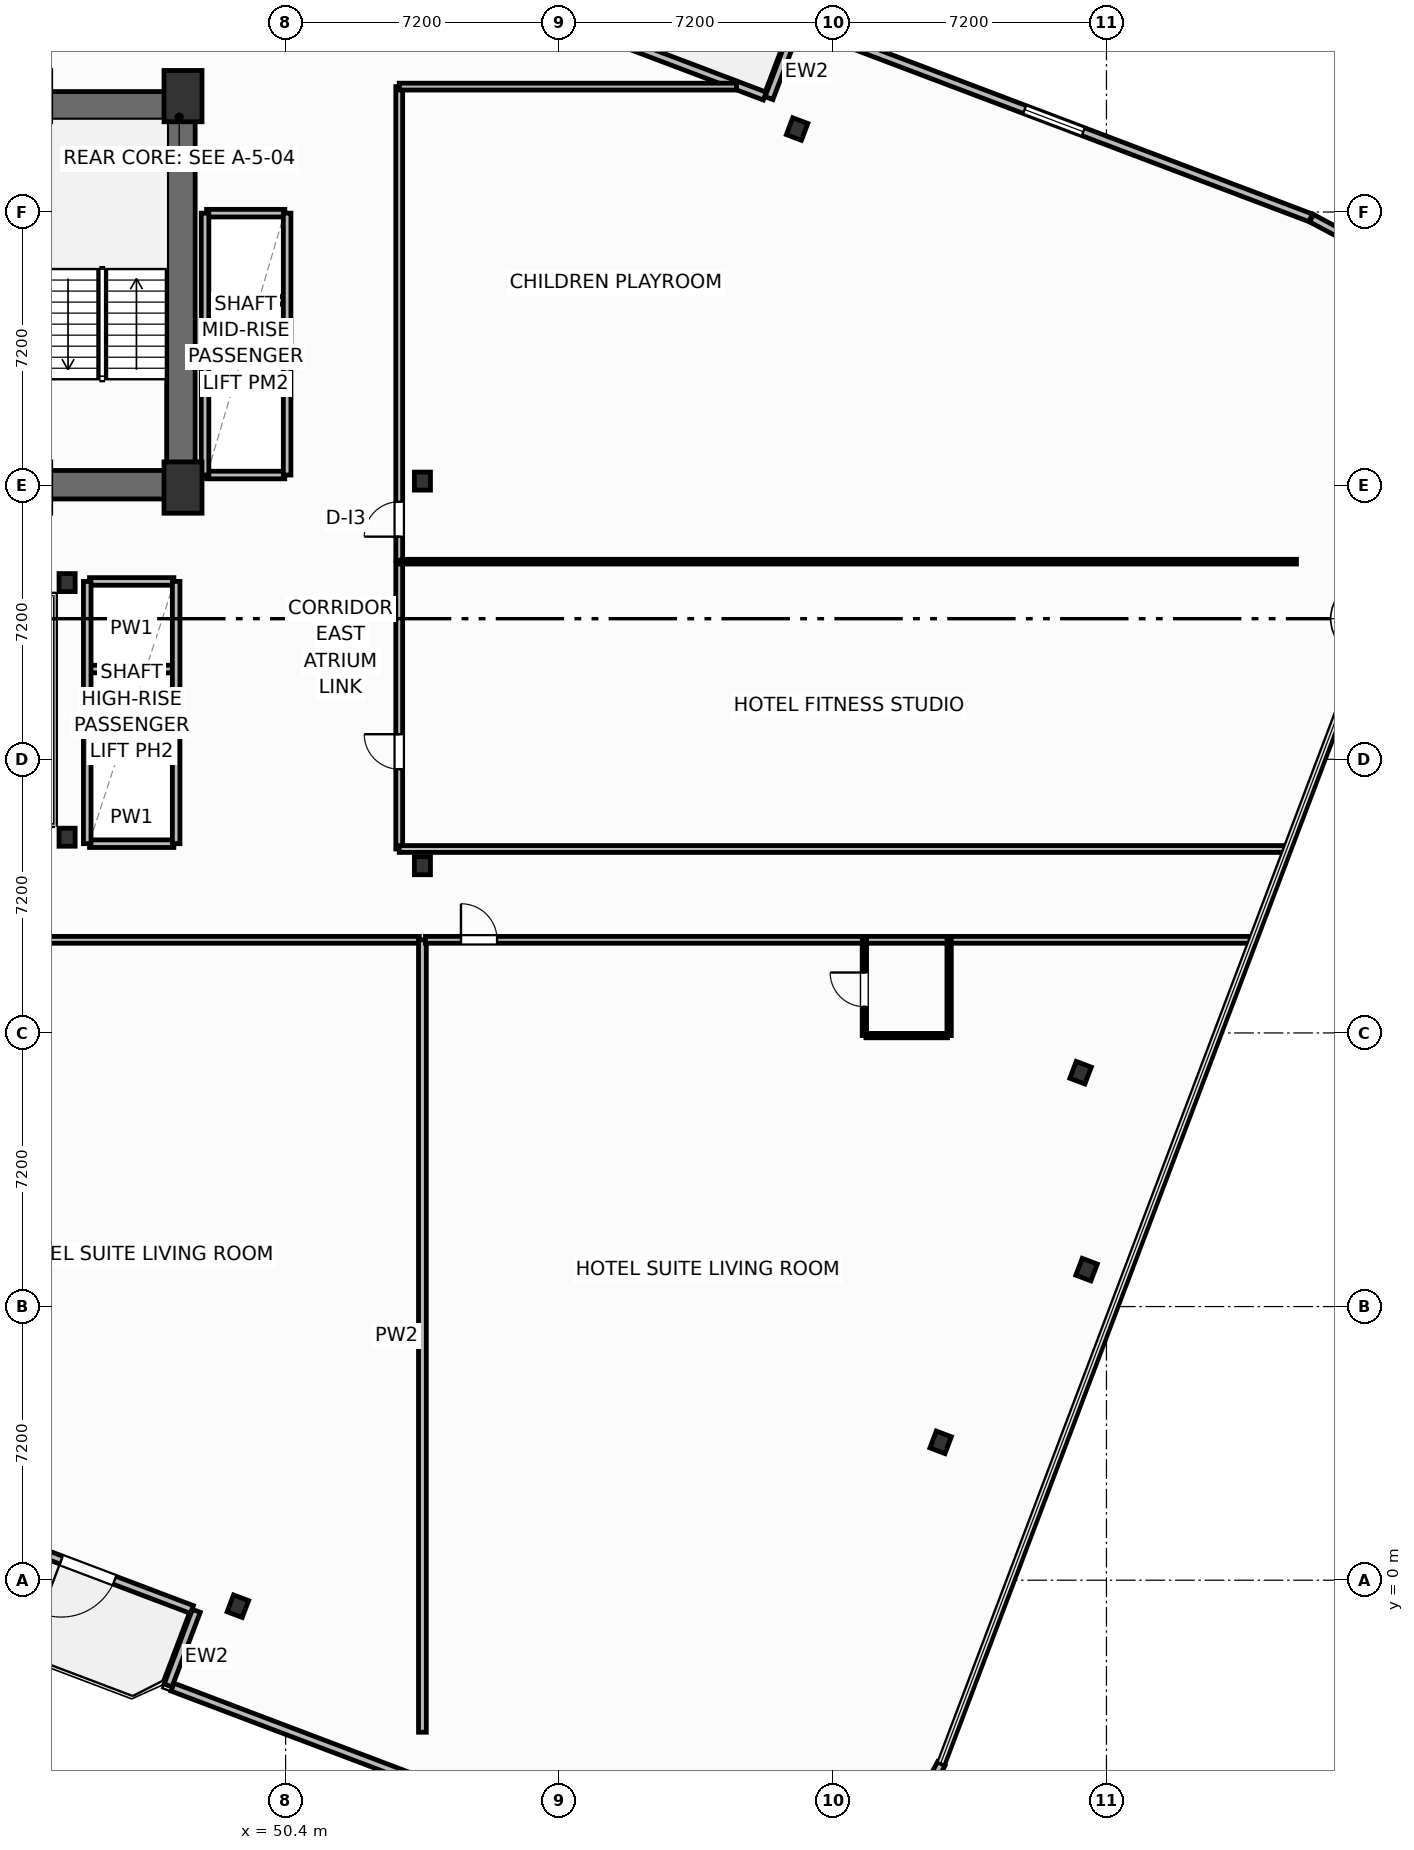
"""IFC4 building model, lengths in metres.
Left out: names, types, materials, properties, quantities, classifications, styles, units other than length and angle.
Written with IfcOpenShell. Run it as: python <this file> out.ifc"""

import sys

from ifc_helpers import new_model, si_unit, direction, frame, frame_2d, origin, origin_2d, place, context, subcontext, project, spatial, rectangle, i_section, extrude, element, fill, save


model = new_model("IFC4")
c1 = context("Model", 3, precision=1e-05, world=origin(), true_north=direction((0.0, 1.0)))
c2 = subcontext(c1, "Body", "Model", "MODEL_VIEW")
j1 = project(units=[si_unit("LENGTHUNIT", "METRE"), si_unit("PLANEANGLEUNIT", "RADIAN")], contexts=[c1])
p1 = place(None, origin())
s1 = spatial("IfcSite", under=j1, at=p1, CompositionType="ELEMENT")
p2 = place(p1, origin())
s2 = spatial("IfcBuilding", under=s1, at=p2, CompositionType="ELEMENT")
p3 = place(p2, frame((0.0, 0.0, 98.4)))
s3 = spatial("IfcBuildingStorey", under=s2, at=p3, CompositionType="ELEMENT", Elevation=98.4)
for number, where, z_axis, x_axis in (
    (1, (47.7, 28.75, 0.0), (0.0, 0.0, 1.0), (1.0, 0.0, 0.0)),
    (2, (47.7, 39.05, 0.0), (0.0, 0.0, 1.0), (1.0, 0.0, 0.0)),
):
    element("IfcColumn", number, at=place(p3, frame(where, z_axis=z_axis, x_axis=x_axis)), inside=s3, PredefinedType="COLUMN", context=c2, shape_type="SweptSolid", body=[
        extrude(rectangle(XDim=1.0, YDim=1.35, at=origin_2d()), origin(), (0.0, 0.0, 1.0), 3.7),
    ])
for number, where, z_axis, x_axis in (
    (3, (44.65, 19.55, 0.0), (0.0, 0.0, 1.0), (1.0, 0.0, 0.0)),
    (4, (44.65, 26.25, 0.0), (0.0, 0.0, 1.0), (1.0, 0.0, 0.0)),
    (5, (54.0, 18.8, 0.0), (0.0, 0.0, 1.0), (1.0, 0.0, 0.0)),
    (6, (54.0, 28.92, 0.0), (0.0, 0.0, 1.0), (1.0, 0.0, 0.0)),
):
    element("IfcColumn", number, at=place(p3, frame(where, z_axis=z_axis, x_axis=x_axis)), inside=s3, PredefinedType="COLUMN", context=c2, shape_type="SweptSolid", body=[
        extrude(i_section(OverallWidth=0.424, OverallDepth=0.474, WebThickness=0.048, FlangeThickness=0.077, FilletRadius=0.025, at=origin_2d()), origin(), (0.0, 0.0, 1.0), 3.7),
    ])
p4 = place(p3, frame((30.38, 38.795, 0.0), z_axis=(0.0, 0.0, 1.0), x_axis=(1.0, 0.0, 0.0)))
e7 = element("IfcWall", 7, at=p4, inside=s3, PredefinedType="SHEAR", context=c2, shape_type="SweptSolid", body=[
    extrude(rectangle(XDim=17.64, YDim=0.75, at=frame_2d((8.82, 0.0))), origin(), (0.0, 0.0, 1.0), 3.45),
])
p5 = place(p3, frame((47.645, 29.2, 0.0), z_axis=(0.0, 0.0, 1.0), x_axis=(0.0, 1.0, 0.0)))
e8 = element("IfcWall", 8, at=p5, inside=s3, PredefinedType="SHEAR", context=c2, shape_type="SweptSolid", body=[
    extrude(rectangle(XDim=9.22, YDim=0.75, at=frame_2d((4.61, 0.0))), origin(), (0.0, 0.0, 1.0), 3.45),
])
p6 = place(p3, frame((43.6, 28.825, 0.0), z_axis=(0.0, 0.0, 1.0), x_axis=(1.0, 0.0, 0.0)))
e9 = element("IfcWall", 9, at=p6, inside=s3, PredefinedType="SHEAR", context=c2, shape_type="SweptSolid", body=[
    extrude(rectangle(XDim=4.42, YDim=0.75, at=frame_2d((2.21, 0.0))), origin(), (0.0, 0.0, 1.0), 3.45),
])
for number, where, z_axis, x_axis in (
    (10, (49.144, -0.684, 0.0), (0.0, 0.0, 1.0), (0.935, -0.354, 0.0)),
    (11, (67.637, 3.628, 0.0), (0.0, 0.0, 1.0), (0.935, -0.354, 0.0)),
    (12, (71.477, 8.173, 0.0), (0.0, 0.0, 1.0), (0.935, -0.354, 0.0)),
    (13, (71.319, 13.354, 0.0), (0.0, 0.0, 1.0), (0.935, -0.354, 0.0)),
    (14, (63.859, 38.184, 0.0), (0.0, 0.0, 1.0), (0.935, -0.354, 0.0)),
):
    element("IfcColumn", number, at=place(p3, frame(where, z_axis=z_axis, x_axis=x_axis)), inside=s3, PredefinedType="COLUMN", context=c2, shape_type="SweptSolid", body=[
        extrude(i_section(OverallWidth=0.424, OverallDepth=0.474, WebThickness=0.048, FlangeThickness=0.077, FilletRadius=0.025, at=origin_2d()), origin(), (0.0, 0.0, 1.0), 3.7),
    ])
p7 = place(p3, frame((47.935, -0.771, 0.0), z_axis=(0.0, 0.0, 1.0), x_axis=(-0.935227640088, 0.354046976001, 0.0)))
e15 = element("IfcWall", 15, at=p7, inside=s3, PredefinedType="SOLIDWALL", context=c2, shape_type="SweptSolid", body=[
    extrude(rectangle(XDim=6.0, YDim=0.22, at=frame_2d((3.0, 0.0))), origin(), (0.0, 0.0, 1.0), 2.73),
])
p8 = place(p7, frame((2.176, 0.0, 0.0)))
e16 = element("IfcOpeningElement", 16, at=p8, cuts=e15, PredefinedType="OPENING", context=c2, shape_type="SweptSolid", body=[
    extrude(rectangle(XDim=1.5, YDim=2.25, at=frame_2d((0.75, 1.125))), frame((0.0, 0.12, 0.0), z_axis=(0.0, -1.0, 0.0), x_axis=(1.0, 0.0, 0.0)), (0.0, 0.0, 1.0), 0.24),
])
p9 = place(p3, frame((57.399, 41.175, 0.0), z_axis=(0.0, 0.0, 1.0), x_axis=(0.935227640088, -0.354046976001, 0.0)))
e17 = element("IfcWall", 17, at=p9, inside=s3, PredefinedType="SOLIDWALL", context=c2, shape_type="SweptSolid", body=[
    extrude(rectangle(XDim=6.0, YDim=0.22, at=frame_2d((3.0, 0.0))), origin(), (0.0, 0.0, 1.0), 2.73),
])
p10 = place(p9, frame((0.4, 0.0, 0.0)))
e18 = element("IfcOpeningElement", 18, at=p10, cuts=e17, PredefinedType="OPENING", context=c2, shape_type="SweptSolid", body=[
    extrude(rectangle(XDim=1.5, YDim=2.25, at=frame_2d((0.75, 1.125))), frame((0.0, 0.12, 0.0), z_axis=(0.0, -1.0, 0.0), x_axis=(1.0, 0.0, 0.0)), (0.0, 0.0, 1.0), 0.24),
])
p11 = place(p3, frame((48.051, -0.805, 0.0), z_axis=(0.0, 0.0, 1.0), x_axis=(-0.353988291547, -0.935249854022, 0.0)))
e19 = element("IfcWall", 19, at=p11, inside=s3, PredefinedType="SOLIDWALL", context=c2, shape_type="SweptSolid", body=[
    extrude(rectangle(XDim=2.1, YDim=0.22, at=frame_2d((1.05, 0.0))), origin(), (0.0, 0.0, 1.0), 2.73),
])
p12 = place(p3, frame((47.424, -2.813, 0.0), z_axis=(0.0, 0.0, 1.0), x_axis=(0.935225962032, -0.354051408614, 0.0)))
e20 = element("IfcWall", 20, at=p12, inside=s3, PredefinedType="SOLIDWALL", context=c2, shape_type="SweptSolid", body=[
    extrude(rectangle(XDim=14.347, YDim=0.22, at=frame_2d((7.173, 0.0))), origin(), (0.0, 0.0, 1.0), 2.73),
])
p13 = place(p12, frame((6.348, 0.0, 0.8)))
e21 = element("IfcOpeningElement", 21, at=p13, cuts=e20, PredefinedType="OPENING", context=c2, shape_type="SweptSolid", body=[
    extrude(rectangle(XDim=1.65, YDim=1.65, at=frame_2d((0.825, 0.825))), frame((0.0, 0.12, 0.0), z_axis=(0.0, -1.0, 0.0), x_axis=(1.0, 0.0, 0.0)), (0.0, 0.0, 1.0), 0.24),
])
p14 = place(p3, frame((67.015, -6.019, 0.0), z_axis=(0.0, 0.0, 1.0), x_axis=(0.473077364598, 0.881020889142, 0.0)))
e22 = element("IfcWall", 22, at=p14, inside=s3, PredefinedType="SOLIDWALL", context=c2, shape_type="SweptSolid", body=[
    extrude(rectangle(XDim=1.353, YDim=0.22, at=frame_2d((0.677, 0.0))), origin(), (0.0, 0.0, 1.0), 2.73),
])
p15 = place(p3, frame((78.597, 35.194, 0.0), z_axis=(0.0, 0.0, 1.0), x_axis=(-0.880948732004, 0.473211719614, 0.0)))
e23 = element("IfcWall", 23, at=p15, inside=s3, PredefinedType="SOLIDWALL", context=c2, shape_type="SweptSolid", body=[
    extrude(rectangle(XDim=1.361, YDim=0.22, at=frame_2d((0.681, 0.0))), origin(), (0.0, 0.0, 1.0), 2.73),
])
p16 = place(p3, frame((77.375, 35.847, 0.0), z_axis=(0.0, 0.0, 1.0), x_axis=(-0.935222448475, 0.354060689526, 0.0)))
e24 = element("IfcWall", 24, at=p16, inside=s3, PredefinedType="SOLIDWALL", context=c2, shape_type="SweptSolid", body=[
    extrude(rectangle(XDim=14.447, YDim=0.22, at=frame_2d((7.224, 0.0))), origin(), (0.0, 0.0, 1.0), 2.73),
])
p17 = place(p16, frame((6.399, 0.0, 0.8)))
e25 = element("IfcOpeningElement", 25, at=p17, cuts=e24, PredefinedType="OPENING", context=c2, shape_type="SweptSolid", body=[
    extrude(rectangle(XDim=1.65, YDim=1.65, at=frame_2d((0.825, 0.825))), frame((0.0, 0.12, 0.0), z_axis=(0.0, -1.0, 0.0), x_axis=(1.0, 0.0, 0.0)), (0.0, 0.0, 1.0), 0.24),
])
p18 = place(p3, frame((63.819, 40.845, 0.0), z_axis=(0.0, 0.0, 1.0), x_axis=(-0.354128791944, -0.935196663123, 0.0)))
e26 = element("IfcWall", 26, at=p18, inside=s3, PredefinedType="SOLIDWALL", context=c2, shape_type="SweptSolid", body=[
    extrude(rectangle(XDim=1.975, YDim=0.22, at=frame_2d((0.988, 0.0))), origin(), (0.0, 0.0, 1.0), 2.73),
])
p19 = place(p3, frame((39.28, 16.85, 0.0), z_axis=(0.0, 0.0, 1.0), x_axis=(1.0, 0.0, 0.0)))
e27 = element("IfcWall", 27, at=p19, inside=s3, PredefinedType="PARTITIONING", context=c2, shape_type="SweptSolid", body=[
    extrude(rectangle(XDim=14.64, YDim=0.18, at=frame_2d((7.32, 0.0))), origin(), (0.0, 0.0, 1.0), 3.45),
])
p20 = place(p19, frame((3.322, 0.0, 0.0)))
e28 = element("IfcOpeningElement", 28, at=p20, cuts=e27, PredefinedType="OPENING", context=c2, shape_type="SweptSolid", body=[
    extrude(rectangle(XDim=0.95, YDim=2.15, at=frame_2d((0.475, 1.075))), frame((0.0, 0.1, 0.0), z_axis=(0.0, -1.0, 0.0), x_axis=(1.0, 0.0, 0.0)), (0.0, 0.0, 1.0), 0.2),
])
p21 = place(p3, frame((54.0, -4.0, 0.0), z_axis=(0.0, 0.0, 1.0), x_axis=(0.0, 1.0, 0.0)))
e29 = element("IfcWall", 29, at=p21, inside=s3, PredefinedType="PARTITIONING", context=c2, shape_type="SweptSolid", body=[
    extrude(rectangle(XDim=20.85, YDim=0.205, at=frame_2d((10.425, 0.0))), origin(), (0.0, 0.0, 1.0), 3.45),
])
p22 = place(p3, frame((54.08, 16.85, 0.0), z_axis=(0.0, 0.0, 1.0), x_axis=(1.0, 0.0, 0.0)))
e30 = element("IfcWall", 30, at=p22, inside=s3, PredefinedType="PARTITIONING", context=c2, shape_type="SweptSolid", body=[
    extrude(rectangle(XDim=21.722, YDim=0.18, at=frame_2d((10.861, 0.0))), origin(), (0.0, 0.0, 1.0), 2.58),
])
p23 = place(p22, frame((0.934, 0.0, 0.0)))
e31 = element("IfcOpeningElement", 31, at=p23, cuts=e30, PredefinedType="OPENING", context=c2, shape_type="SweptSolid", body=[
    extrude(rectangle(XDim=0.95, YDim=2.15, at=frame_2d((0.475, 1.075))), frame((0.0, 0.1, 0.0), z_axis=(0.0, -1.0, 0.0), x_axis=(1.0, 0.0, 0.0)), (0.0, 0.0, 1.0), 0.2),
])
p24 = place(p3, frame((65.67, 14.33, 0.0), z_axis=(0.0, 0.0, 1.0), x_axis=(1.0, 0.0, 0.0)))
e32 = element("IfcWall", 32, at=p24, inside=s3, PredefinedType="PARTITIONING", context=c2, shape_type="SweptSolid", body=[
    extrude(rectangle(XDim=2.15, YDim=0.115, at=frame_2d((1.075, 0.0))), origin(), (0.0, 0.0, 1.0), 2.58),
])
p25 = place(p3, frame((65.63, 14.33, 0.0), z_axis=(0.0, 0.0, 1.0), x_axis=(0.0, 1.0, 0.0)))
e33 = element("IfcWall", 33, at=p25, inside=s3, PredefinedType="PARTITIONING", context=c2, shape_type="SweptSolid", body=[
    extrude(rectangle(XDim=2.52, YDim=0.115, at=frame_2d((1.26, 0.0))), origin(), (0.0, 0.0, 1.0), 3.45),
])
p26 = place(p25, frame((0.76, 0.0, 0.0)))
e34 = element("IfcOpeningElement", 34, at=p26, cuts=e33, PredefinedType="OPENING", context=c2, shape_type="SweptSolid", body=[
    extrude(rectangle(XDim=0.9, YDim=2.05, at=frame_2d((0.45, 1.025))), frame((0.0, 0.067, 0.0), z_axis=(0.0, -1.0, 0.0), x_axis=(1.0, 0.0, 0.0)), (0.0, 0.0, 1.0), 0.135),
])
p27 = place(p3, frame((67.86, 14.33, 0.0), z_axis=(0.0, 0.0, 1.0), x_axis=(0.0, 1.0, 0.0)))
e35 = element("IfcWall", 35, at=p27, inside=s3, PredefinedType="PARTITIONING", context=c2, shape_type="SweptSolid", body=[
    extrude(rectangle(XDim=2.52, YDim=0.115, at=frame_2d((1.26, 0.0))), origin(), (0.0, 0.0, 1.0), 3.45),
])
p28 = place(p3, frame((53.39, 19.24, 0.0), z_axis=(0.0, 0.0, 1.0), x_axis=(0.0, 1.0, 0.0)))
e36 = element("IfcWall", 36, at=p28, inside=s3, PredefinedType="PARTITIONING", context=c2, shape_type="SweptSolid", body=[
    extrude(rectangle(XDim=7.52, YDim=0.18, at=frame_2d((3.76, 0.0))), origin(), (0.0, 0.0, 1.0), 3.45),
])
p29 = place(p28, frame((2.1, 0.0, 0.0)))
e37 = element("IfcOpeningElement", 37, at=p29, cuts=e36, PredefinedType="OPENING", context=c2, shape_type="SweptSolid", body=[
    extrude(rectangle(XDim=0.92, YDim=2.05, at=frame_2d((0.46, 1.025))), frame((0.0, 0.1, 0.0), z_axis=(0.0, -1.0, 0.0), x_axis=(1.0, 0.0, 0.0)), (0.0, 0.0, 1.0), 0.2),
])
p30 = place(p3, frame((53.39, 26.8, 0.0), z_axis=(0.0, 0.0, 1.0), x_axis=(1.0, 0.0, 0.0)))
e38 = element("IfcWall", 38, at=p30, inside=s3, PredefinedType="PARTITIONING", context=c2, shape_type="SweptSolid", body=[
    extrude(rectangle(XDim=23.61, YDim=0.125, at=frame_2d((11.805, 0.0))), origin(), (0.0, 0.0, 1.0), 3.45),
])
p31 = place(p3, frame((53.39, 19.24, 0.0), z_axis=(0.0, 0.0, 1.0), x_axis=(1.0, 0.0, 0.0)))
e39 = element("IfcWall", 39, at=p31, inside=s3, PredefinedType="PARTITIONING", context=c2, shape_type="SweptSolid", body=[
    extrude(rectangle(XDim=23.317, YDim=0.18, at=frame_2d((11.658, 0.0))), origin(), (0.0, 0.0, 1.0), 3.45),
])
p32 = place(p3, frame((53.39, 26.84, 0.0), z_axis=(0.0, 0.0, 1.0), x_axis=(0.0, 1.0, 0.0)))
e40 = element("IfcWall", 40, at=p32, inside=s3, PredefinedType="PARTITIONING", context=c2, shape_type="SweptSolid", body=[
    extrude(rectangle(XDim=12.46, YDim=0.18, at=frame_2d((6.23, 0.0))), origin(), (0.0, 0.0, 1.0), 3.45),
])
p33 = place(p32, frame((0.618, 0.0, 0.0)))
e41 = element("IfcOpeningElement", 41, at=p33, cuts=e40, PredefinedType="OPENING", context=c2, shape_type="SweptSolid", body=[
    extrude(rectangle(XDim=0.92, YDim=2.05, at=frame_2d((0.46, 1.025))), frame((0.0, 0.1, 0.0), z_axis=(0.0, -1.0, 0.0), x_axis=(1.0, 0.0, 0.0)), (0.0, 0.0, 1.0), 0.2),
])
p34 = place(p3, frame((53.39, 39.3, 0.0), z_axis=(0.0, 0.0, 1.0), x_axis=(1.0, 0.0, 0.0)))
e42 = element("IfcWall", 42, at=p34, inside=s3, PredefinedType="PARTITIONING", context=c2, shape_type="SweptSolid", body=[
    extrude(rectangle(XDim=8.876, YDim=0.18, at=frame_2d((4.438, 0.0))), origin(), (0.0, 0.0, 1.0), 3.45),
])
for number, where, z_axis, x_axis in (
    (43, (48.32, 31.375, 0.0), (0.0, 0.0, 1.0), (1.0, 0.0, 0.0)),
    (44, (48.32, 33.675, 0.0), (0.0, 0.0, 1.0), (1.0, 0.0, 0.0)),
):
    element("IfcWall", number, at=place(p3, frame(where, z_axis=z_axis, x_axis=x_axis)), inside=s3, PredefinedType="PARTITIONING", context=c2, shape_type="SweptSolid", body=[
        extrude(rectangle(XDim=2.06, YDim=0.2, at=frame_2d((1.03, 0.0))), origin(), (0.0, 0.0, 1.0), 3.45),
    ])
p35 = place(p3, frame((48.32, 29.08, 0.0), z_axis=(0.0, 0.0, 1.0), x_axis=(1.0, 0.0, 0.0)))
e45 = element("IfcWall", 45, at=p35, inside=s3, PredefinedType="PARTITIONING", context=c2, shape_type="SweptSolid", body=[
    extrude(rectangle(XDim=2.06, YDim=0.2, at=frame_2d((1.03, 0.0))), origin(), (0.0, 0.0, 1.0), 2.662),
])
p36 = place(p3, frame((48.32, 35.97, 0.0), z_axis=(0.0, 0.0, 1.0), x_axis=(1.0, 0.0, 0.0)))
e46 = element("IfcWall", 46, at=p36, inside=s3, PredefinedType="PARTITIONING", context=c2, shape_type="SweptSolid", body=[
    extrude(rectangle(XDim=2.06, YDim=0.2, at=frame_2d((1.03, 0.0))), origin(), (0.0, 0.0, 1.0), 3.45),
])
for number, where, z_axis, x_axis in (
    (47, (48.28, 29.08, 0.0), (0.0, 0.0, 1.0), (0.0, 1.0, 0.0)),
    (48, (50.44, 29.08, 0.0), (0.0, 0.0, 1.0), (0.0, 1.0, 0.0)),
):
    element("IfcWall", number, at=place(p3, frame(where, z_axis=z_axis, x_axis=x_axis)), inside=s3, PredefinedType="PARTITIONING", context=c2, shape_type="SweptSolid", body=[
        extrude(rectangle(XDim=6.89, YDim=0.2, at=frame_2d((3.445, 0.0))), origin(), (0.0, 0.0, 1.0), 3.45),
    ])
for number, where, z_axis, x_axis in (
    (49, (45.24, 21.675, 0.0), (0.0, 0.0, 1.0), (1.0, 0.0, 0.0)),
    (50, (45.24, 23.975, 0.0), (0.0, 0.0, 1.0), (1.0, 0.0, 0.0)),
):
    element("IfcWall", number, at=place(p3, frame(where, z_axis=z_axis, x_axis=x_axis)), inside=s3, PredefinedType="PARTITIONING", context=c2, shape_type="SweptSolid", body=[
        extrude(rectangle(XDim=2.22, YDim=0.2, at=frame_2d((1.11, 0.0))), origin(), (0.0, 0.0, 1.0), 3.45),
    ])
p37 = place(p3, frame((45.24, 19.38, 0.0), z_axis=(0.0, 0.0, 1.0), x_axis=(1.0, 0.0, 0.0)))
e51 = element("IfcWall", 51, at=p37, inside=s3, PredefinedType="PARTITIONING", context=c2, shape_type="SweptSolid", body=[
    extrude(rectangle(XDim=2.22, YDim=0.2, at=frame_2d((1.11, 0.0))), origin(), (0.0, 0.0, 1.0), 2.662),
])
p38 = place(p3, frame((45.24, 26.28, 0.0), z_axis=(0.0, 0.0, 1.0), x_axis=(1.0, 0.0, 0.0)))
e52 = element("IfcWall", 52, at=p38, inside=s3, PredefinedType="PARTITIONING", context=c2, shape_type="SweptSolid", body=[
    extrude(rectangle(XDim=2.22, YDim=0.2, at=frame_2d((1.11, 0.0))), origin(), (0.0, 0.0, 1.0), 3.45),
])
for number, where, z_axis, x_axis in (
    (53, (45.18, 19.38, 0.0), (0.0, 0.0, 1.0), (0.0, 1.0, 0.0)),
    (54, (47.52, 19.38, 0.0), (0.0, 0.0, 1.0), (0.0, 1.0, 0.0)),
):
    element("IfcWall", number, at=place(p3, frame(where, z_axis=z_axis, x_axis=x_axis)), inside=s3, PredefinedType="PARTITIONING", context=c2, shape_type="SweptSolid", body=[
        extrude(rectangle(XDim=6.9, YDim=0.2, at=frame_2d((3.45, 0.0))), origin(), (0.0, 0.0, 1.0), 3.45),
    ])
p39 = place(p8, origin())
e55 = element("IfcDoor", 55, at=p39, inside=s3, OperationType="SINGLE_SWING_RIGHT", PredefinedType="DOOR", context=c2, shape_type="SweptSolid", body=[
    extrude(rectangle(XDim=1.5, YDim=2.25, at=frame_2d((0.75, 1.125))), frame((0.0, 0.025, 0.0), z_axis=(0.0, -1.0, 0.0), x_axis=(1.0, 0.0, 0.0)), (0.0, 0.0, 1.0), 0.05),
])
fill(e16, e55)
p40 = place(p17, origin())
e56 = element("IfcWindow", 56, at=p40, inside=s3, PartitioningType="SINGLE_PANEL", PredefinedType="WINDOW", context=c2, shape_type="SweptSolid", body=[
    extrude(rectangle(XDim=1.65, YDim=1.65, at=frame_2d((0.825, 0.825))), frame((0.0, 0.03, 0.0), z_axis=(0.0, -1.0, 0.0), x_axis=(1.0, 0.0, 0.0)), (0.0, 0.0, 1.0), 0.06),
])
fill(e25, e56)
p41 = place(p23, origin())
e57 = element("IfcDoor", 57, at=p41, inside=s3, OperationType="SINGLE_SWING_LEFT", PredefinedType="DOOR", context=c2, shape_type="SweptSolid", body=[
    extrude(rectangle(XDim=0.95, YDim=2.15, at=frame_2d((0.475, 1.075))), frame((0.0, 0.025, 0.0), z_axis=(0.0, -1.0, 0.0), x_axis=(1.0, 0.0, 0.0)), (0.0, 0.0, 1.0), 0.05),
])
fill(e31, e57)
p42 = place(p26, origin())
e58 = element("IfcDoor", 58, at=p42, inside=s3, OperationType="SINGLE_SWING_RIGHT", PredefinedType="DOOR", context=c2, shape_type="SweptSolid", body=[
    extrude(rectangle(XDim=0.9, YDim=2.05, at=frame_2d((0.45, 1.025))), frame((0.0, 0.025, 0.0), z_axis=(0.0, -1.0, 0.0), x_axis=(1.0, 0.0, 0.0)), (0.0, 0.0, 1.0), 0.05),
])
fill(e34, e58)
p43 = place(p29, origin())
e59 = element("IfcDoor", 59, at=p43, inside=s3, OperationType="SINGLE_SWING_RIGHT", PredefinedType="DOOR", context=c2, shape_type="SweptSolid", body=[
    extrude(rectangle(XDim=0.92, YDim=2.05, at=frame_2d((0.46, 1.025))), frame((0.0, 0.025, 0.0), z_axis=(0.0, -1.0, 0.0), x_axis=(1.0, 0.0, 0.0)), (0.0, 0.0, 1.0), 0.05),
])
fill(e37, e59)
p44 = place(p33, origin())
e60 = element("IfcDoor", 60, at=p44, inside=s3, OperationType="SINGLE_SWING_LEFT", PredefinedType="DOOR", context=c2, shape_type="SweptSolid", body=[
    extrude(rectangle(XDim=0.92, YDim=2.05, at=frame_2d((0.46, 1.025))), frame((0.0, 0.025, 0.0), z_axis=(0.0, -1.0, 0.0), x_axis=(1.0, 0.0, 0.0)), (0.0, 0.0, 1.0), 0.05),
])
fill(e41, e60)
save(model, sys.argv[1])
